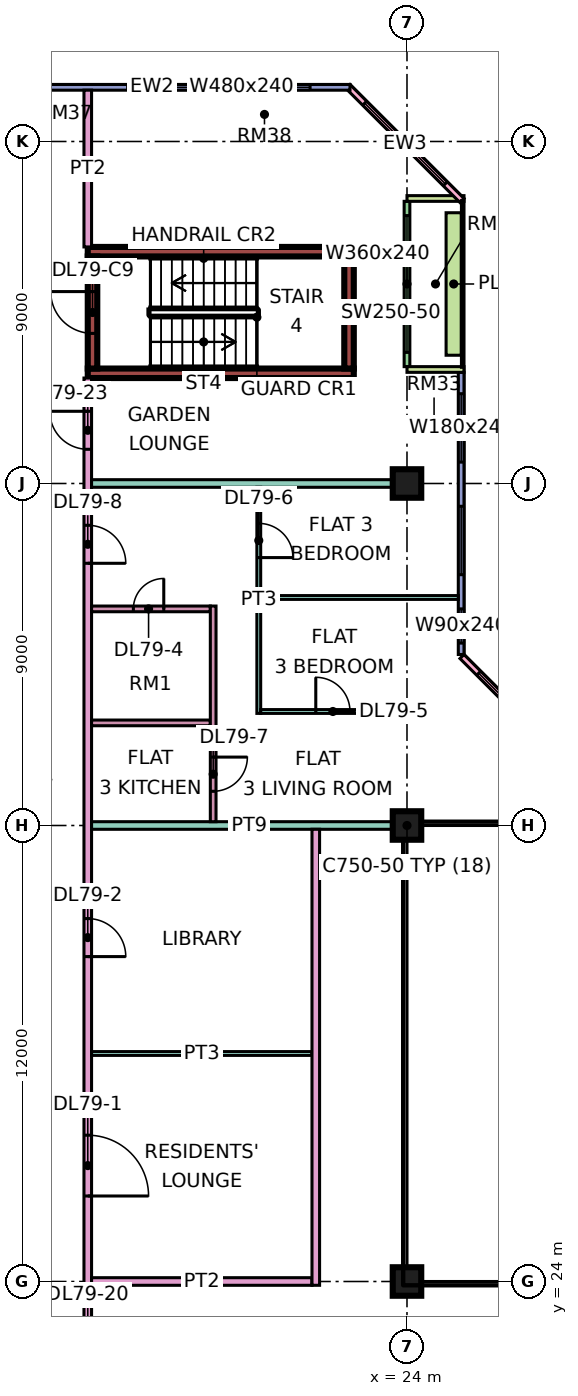
"""IFC4 building model, lengths in metres.
Left out: names, types, materials, properties, quantities, classifications, styles, units other than length and angle.
Written with IfcOpenShell. Run it as: python <this file> out.ifc"""

import sys

from ifc_helpers import new_model, si_unit, direction, frame, frame_2d, origin, origin_2d, place, context, subcontext, project, spatial, rectangle, extrude, element, fill, save


model = new_model("IFC4")
c1 = context("Model", 3, precision=1e-05, world=origin(), true_north=direction((0.0, 1.0)))
c2 = subcontext(c1, "Body", "Model", "MODEL_VIEW")
j1 = project(units=[si_unit("LENGTHUNIT", "METRE"), si_unit("PLANEANGLEUNIT", "RADIAN")], contexts=[c1])
p1 = place(None, origin())
s1 = spatial("IfcSite", under=j1, at=p1, CompositionType="ELEMENT")
p2 = place(p1, origin())
s2 = spatial("IfcBuilding", under=s1, at=p2, CompositionType="ELEMENT")
p3 = place(p2, frame((0.0, 0.0, 342.65)))
s3 = spatial("IfcBuildingStorey", under=s2, at=p3, CompositionType="ELEMENT", Elevation=342.65)
for number, where, z_axis, x_axis in (
    (1, (24.0, 24.0, 0.0), (0.0, 0.0, 1.0), (1.0, 0.0, 0.0)),
    (2, (24.0, 36.0, 0.0), (0.0, 0.0, 1.0), (1.0, 0.0, 0.0)),
    (3, (24.0, 45.0, 0.0), (0.0, 0.0, 1.0), (1.0, 0.0, 0.0)),
):
    element("IfcColumn", number, at=place(p3, frame(where, z_axis=z_axis, x_axis=x_axis)), inside=s3, PredefinedType="COLUMN", context=c2, shape_type="SweptSolid", body=[
        extrude(rectangle(XDim=0.75, YDim=0.75, at=origin_2d()), origin(), (0.0, 0.0, 1.0), 3.75),
    ])
for number, where, z_axis, x_axis in (
    (4, (15.6, 47.9, 0.0), (0.0, 0.0, 1.0), (1.0, 0.0, 0.0)),
    (5, (15.6, 51.1, 0.0), (0.0, 0.0, 1.0), (1.0, 0.0, 0.0)),
):
    element("IfcWall", number, at=place(p3, frame(where, z_axis=z_axis, x_axis=x_axis)), inside=s3, PredefinedType="SHEAR", context=c2, shape_type="SweptSolid", body=[
        extrude(rectangle(XDim=7.0, YDim=0.25, at=frame_2d((3.5, 0.0))), origin(), (0.0, 0.0, 1.0), 3.75),
    ])
p4 = place(p3, frame((15.725, 48.025, 0.0), z_axis=(0.0, 0.0, 1.0), x_axis=(0.0, 1.0, 0.0)))
e6 = element("IfcWall", 6, at=p4, inside=s3, PredefinedType="SHEAR", context=c2, shape_type="SweptSolid", body=[
    extrude(rectangle(XDim=2.95, YDim=0.25, at=frame_2d((1.475, 0.0))), origin(), (0.0, 0.0, 1.0), 3.75),
])
p5 = place(p4, frame((0.925, 0.0, 0.0)))
e7 = element("IfcOpeningElement", 7, at=p5, cuts=e6, PredefinedType="OPENING", context=c2, shape_type="SweptSolid", body=[
    extrude(rectangle(XDim=1.1, YDim=2.2, at=frame_2d((0.55, 1.1))), frame((0.0, 0.135, 0.0), z_axis=(0.0, -1.0, 0.0), x_axis=(1.0, 0.0, 0.0)), (0.0, 0.0, 1.0), 0.27),
])
p6 = place(p3, frame((22.475, 48.025, 0.0), z_axis=(0.0, 0.0, 1.0), x_axis=(0.0, 1.0, 0.0)))
e8 = element("IfcWall", 8, at=p6, inside=s3, PredefinedType="SHEAR", context=c2, shape_type="SweptSolid", body=[
    extrude(rectangle(XDim=2.95, YDim=0.25, at=frame_2d((1.475, 0.0))), origin(), (0.0, 0.0, 1.0), 3.75),
])
p7 = place(p3, frame((28.447, 37.447, 0.0), z_axis=(0.0, 0.0, 1.0), x_axis=(-0.707106781187, 0.707106781187, 0.0)))
e9 = element("IfcWall", 9, at=p7, inside=s3, PredefinedType="SOLIDWALL", context=c2, shape_type="SweptSolid", body=[
    extrude(rectangle(XDim=4.243, YDim=0.15, at=frame_2d((2.121, 0.0))), origin(), (0.0, 0.0, 1.0), 3.35),
])
p8 = place(p7, frame((0.621, 0.0, 0.45)))
e10 = element("IfcOpeningElement", 10, at=p8, cuts=e9, PredefinedType="OPENING", context=c2, shape_type="SweptSolid", body=[
    extrude(rectangle(XDim=3.0, YDim=2.4, at=frame_2d((1.5, 1.2))), frame((0.0, 0.085, 0.0), z_axis=(0.0, -1.0, 0.0), x_axis=(1.0, 0.0, 0.0)), (0.0, 0.0, 1.0), 0.17),
])
p9 = place(p3, frame((25.425, 40.5, 0.0), z_axis=(0.0, 0.0, 1.0), x_axis=(0.0, 1.0, 0.0)))
e11 = element("IfcWall", 11, at=p9, inside=s3, PredefinedType="SOLIDWALL", context=c2, shape_type="SweptSolid", body=[
    extrude(rectangle(XDim=7.425, YDim=0.15, at=frame_2d((3.712, 0.0))), origin(), (0.0, 0.0, 1.0), 3.35),
])
p10 = place(p9, frame((0.3, 0.0, 0.45)))
e12 = element("IfcOpeningElement", 12, at=p10, cuts=e11, PredefinedType="OPENING", context=c2, shape_type="SweptSolid", body=[
    extrude(rectangle(XDim=0.9, YDim=2.4, at=frame_2d((0.45, 1.2))), frame((0.0, 0.085, 0.0), z_axis=(0.0, -1.0, 0.0), x_axis=(1.0, 0.0, 0.0)), (0.0, 0.0, 1.0), 0.17),
])
p11 = place(p9, frame((2.1, 0.0, 0.45)))
e13 = element("IfcOpeningElement", 13, at=p11, cuts=e11, PredefinedType="OPENING", context=c2, shape_type="SweptSolid", body=[
    extrude(rectangle(XDim=1.8, YDim=2.4, at=frame_2d((0.9, 1.2))), frame((0.0, 0.085, 0.0), z_axis=(0.0, -1.0, 0.0), x_axis=(1.0, 0.0, 0.0)), (0.0, 0.0, 1.0), 0.17),
])
p12 = place(p9, frame((5.062, 0.0, 0.45)))
e14 = element("IfcOpeningElement", 14, at=p12, cuts=e11, PredefinedType="OPENING", context=c2, shape_type="SweptSolid", body=[
    extrude(rectangle(XDim=1.8, YDim=2.4, at=frame_2d((0.9, 1.2))), frame((0.0, 0.085, 0.0), z_axis=(0.0, -1.0, 0.0), x_axis=(1.0, 0.0, 0.0)), (0.0, 0.0, 1.0), 0.17),
])
p13 = place(p3, frame((24.0, 48.075, 0.0), z_axis=(0.0, 0.0, 1.0), x_axis=(0.0, 1.0, 0.0)))
e15 = element("IfcWall", 15, at=p13, inside=s3, PredefinedType="SOLIDWALL", context=c2, shape_type="SweptSolid", body=[
    extrude(rectangle(XDim=4.35, YDim=0.15, at=frame_2d((2.175, 0.0))), origin(), (0.0, 0.0, 1.0), 3.35),
])
p14 = place(p13, frame((0.375, 0.0, 0.45)))
e16 = element("IfcOpeningElement", 16, at=p14, cuts=e15, PredefinedType="OPENING", context=c2, shape_type="SweptSolid", body=[
    extrude(rectangle(XDim=3.6, YDim=2.4, at=frame_2d((1.8, 1.2))), frame((0.0, 0.085, 0.0), z_axis=(0.0, -1.0, 0.0), x_axis=(1.0, 0.0, 0.0)), (0.0, 0.0, 1.0), 0.17),
])
for number, where, z_axis, x_axis in (
    (17, (25.5, 48.0, 0.0), (0.0, 0.0, 1.0), (-1.0, 0.0, 0.0)),
    (18, (25.5, 52.5, 0.0), (0.0, 0.0, 1.0), (-1.0, 0.0, 0.0)),
):
    element("IfcWall", number, at=place(p3, frame(where, z_axis=z_axis, x_axis=x_axis)), inside=s3, PredefinedType="SOLIDWALL", context=c2, shape_type="SweptSolid", body=[
        extrude(rectangle(XDim=1.5, YDim=0.15, at=frame_2d((0.75, 0.0))), origin(), (0.0, 0.0, 1.0), 3.35),
    ])
p15 = place(p3, frame((25.447, 52.447, 0.0), z_axis=(0.0, 0.0, 1.0), x_axis=(-0.707106781187, 0.707106781187, 0.0)))
e19 = element("IfcWall", 19, at=p15, inside=s3, PredefinedType="SOLIDWALL", context=c2, shape_type="SweptSolid", body=[
    extrude(rectangle(XDim=4.243, YDim=0.15, at=frame_2d((2.121, 0.0))), origin(), (0.0, 0.0, 1.0), 3.35),
])
p16 = place(p15, frame((0.621, 0.0, 0.45)))
e20 = element("IfcOpeningElement", 20, at=p16, cuts=e19, PredefinedType="OPENING", context=c2, shape_type="SweptSolid", body=[
    extrude(rectangle(XDim=3.0, YDim=2.4, at=frame_2d((1.5, 1.2))), frame((0.0, 0.085, 0.0), z_axis=(0.0, -1.0, 0.0), x_axis=(1.0, 0.0, 0.0)), (0.0, 0.0, 1.0), 0.17),
])
p17 = place(p3, frame((22.5, 55.425, 0.0), z_axis=(0.0, 0.0, 1.0), x_axis=(-1.0, 0.0, 0.0)))
e21 = element("IfcWall", 21, at=p17, inside=s3, PredefinedType="SOLIDWALL", context=c2, shape_type="SweptSolid", body=[
    extrude(rectangle(XDim=10.425, YDim=0.15, at=frame_2d((5.212, 0.0))), origin(), (0.0, 0.0, 1.0), 3.35),
])
p18 = place(p17, frame((1.05, 0.0, 0.45)))
e22 = element("IfcOpeningElement", 22, at=p18, cuts=e21, PredefinedType="OPENING", context=c2, shape_type="SweptSolid", body=[
    extrude(rectangle(XDim=4.8, YDim=2.4, at=frame_2d((2.4, 1.2))), frame((0.0, 0.085, 0.0), z_axis=(0.0, -1.0, 0.0), x_axis=(1.0, 0.0, 0.0)), (0.0, 0.0, 1.0), 0.17),
])
p19 = place(p3, frame((25.229, 48.375, 0.0), z_axis=(0.0, 0.0, 1.0), x_axis=(0.0, 1.0, 0.0)))
e23 = element("IfcWall", 23, at=p19, inside=s3, PredefinedType="SOLIDWALL", context=c2, shape_type="SweptSolid", body=[
    extrude(rectangle(XDim=3.75, YDim=0.4, at=frame_2d((1.875, 0.0))), origin(), (0.0, 0.0, 1.0), 0.7),
])
p20 = place(p3, frame((15.6, 20.0, 0.0), z_axis=(0.0, 0.0, 1.0), x_axis=(0.0, 1.0, 0.0)))
e24 = element("IfcWall", 24, at=p20, inside=s3, PredefinedType="PARTITIONING", context=c2, shape_type="SweptSolid", body=[
    extrude(rectangle(XDim=27.775, YDim=0.2, at=frame_2d((13.887, 0.0))), origin(), (0.0, 0.0, 1.0), 3.35),
])
p21 = place(p20, frame((6.25, 0.0, 0.0)))
e25 = element("IfcOpeningElement", 25, at=p21, cuts=e24, PredefinedType="OPENING", context=c2, shape_type="SweptSolid", body=[
    extrude(rectangle(XDim=1.6, YDim=2.1, at=frame_2d((0.8, 1.05))), frame((0.0, 0.11, 0.0), z_axis=(0.0, -1.0, 0.0), x_axis=(1.0, 0.0, 0.0)), (0.0, 0.0, 1.0), 0.22),
])
p22 = place(p20, frame((12.55, 0.0, 0.0)))
e26 = element("IfcOpeningElement", 26, at=p22, cuts=e24, PredefinedType="OPENING", context=c2, shape_type="SweptSolid", body=[
    extrude(rectangle(XDim=1.0, YDim=2.1, at=frame_2d((0.5, 1.05))), frame((0.0, 0.11, 0.0), z_axis=(0.0, -1.0, 0.0), x_axis=(1.0, 0.0, 0.0)), (0.0, 0.0, 1.0), 0.22),
])
p23 = place(p20, frame((22.9, 0.0, 0.0)))
e27 = element("IfcOpeningElement", 27, at=p23, cuts=e24, PredefinedType="OPENING", context=c2, shape_type="SweptSolid", body=[
    extrude(rectangle(XDim=1.0, YDim=2.1, at=frame_2d((0.5, 1.05))), frame((0.0, 0.11, 0.0), z_axis=(0.0, -1.0, 0.0), x_axis=(1.0, 0.0, 0.0)), (0.0, 0.0, 1.0), 0.22),
])
p24 = place(p20, frame((1.15, 0.0, 0.0)))
e28 = element("IfcOpeningElement", 28, at=p24, cuts=e24, PredefinedType="OPENING", context=c2, shape_type="SweptSolid", body=[
    extrude(rectangle(XDim=1.8, YDim=2.1, at=frame_2d((0.9, 1.05))), frame((0.0, 0.11, 0.0), z_axis=(0.0, -1.0, 0.0), x_axis=(1.0, 0.0, 0.0)), (0.0, 0.0, 1.0), 0.22),
])
p25 = place(p20, frame((25.9, 0.0, 0.0)))
e29 = element("IfcOpeningElement", 29, at=p25, cuts=e24, PredefinedType="OPENING", context=c2, shape_type="SweptSolid", body=[
    extrude(rectangle(XDim=1.0, YDim=2.1, at=frame_2d((0.5, 1.05))), frame((0.0, 0.11, 0.0), z_axis=(0.0, -1.0, 0.0), x_axis=(1.0, 0.0, 0.0)), (0.0, 0.0, 1.0), 0.22),
])
p26 = place(p3, frame((15.6, 51.225, 0.0), z_axis=(0.0, 0.0, 1.0), x_axis=(0.0, 1.0, 0.0)))
e30 = element("IfcWall", 30, at=p26, inside=s3, PredefinedType="PARTITIONING", context=c2, shape_type="SweptSolid", body=[
    extrude(rectangle(XDim=4.125, YDim=0.2, at=frame_2d((2.062, 0.0))), origin(), (0.0, 0.0, 1.0), 3.35),
])
p27 = place(p3, frame((15.7, 24.0, 0.0), z_axis=(0.0, 0.0, 1.0), x_axis=(1.0, 0.0, 0.0)))
e31 = element("IfcWall", 31, at=p27, inside=s3, PredefinedType="PARTITIONING", context=c2, shape_type="SweptSolid", body=[
    extrude(rectangle(XDim=5.8, YDim=0.2, at=frame_2d((2.9, 0.0))), origin(), (0.0, 0.0, 1.0), 3.35),
])
p28 = place(p3, frame((15.7, 30.0, 0.0), z_axis=(0.0, 0.0, 1.0), x_axis=(1.0, 0.0, 0.0)))
e32 = element("IfcWall", 32, at=p28, inside=s3, PredefinedType="PARTITIONING", context=c2, shape_type="SweptSolid", body=[
    extrude(rectangle(XDim=5.8, YDim=0.1, at=frame_2d((2.9, 0.0))), origin(), (0.0, 0.0, 1.0), 3.35),
])
p29 = place(p3, frame((15.7, 36.0, 0.0), z_axis=(0.0, 0.0, 1.0), x_axis=(1.0, 0.0, 0.0)))
e33 = element("IfcWall", 33, at=p29, inside=s3, PredefinedType="PARTITIONING", context=c2, shape_type="SweptSolid", body=[
    extrude(rectangle(XDim=8.3, YDim=0.2, at=frame_2d((4.15, 0.0))), origin(), (0.0, 0.0, 1.0), 3.35),
])
p30 = place(p3, frame((15.7, 38.7, 0.0), z_axis=(0.0, 0.0, 1.0), x_axis=(1.0, 0.0, 0.0)))
e34 = element("IfcWall", 34, at=p30, inside=s3, PredefinedType="PARTITIONING", context=c2, shape_type="SweptSolid", body=[
    extrude(rectangle(XDim=3.125, YDim=0.15, at=frame_2d((1.562, 0.0))), origin(), (0.0, 0.0, 1.0), 3.35),
])
p31 = place(p3, frame((15.7, 41.7, 0.0), z_axis=(0.0, 0.0, 1.0), x_axis=(1.0, 0.0, 0.0)))
e35 = element("IfcWall", 35, at=p31, inside=s3, PredefinedType="PARTITIONING", context=c2, shape_type="SweptSolid", body=[
    extrude(rectangle(XDim=3.125, YDim=0.15, at=frame_2d((1.562, 0.0))), origin(), (0.0, 0.0, 1.0), 3.35),
])
p32 = place(p31, frame((1.1, 0.0, 0.0)))
e36 = element("IfcOpeningElement", 36, at=p32, cuts=e35, PredefinedType="OPENING", context=c2, shape_type="SweptSolid", body=[
    extrude(rectangle(XDim=0.8, YDim=2.1, at=frame_2d((0.4, 1.05))), frame((0.0, 0.085, 0.0), z_axis=(0.0, -1.0, 0.0), x_axis=(1.0, 0.0, 0.0)), (0.0, 0.0, 1.0), 0.17),
])
p33 = place(p3, frame((15.7, 45.0, 0.0), z_axis=(0.0, 0.0, 1.0), x_axis=(1.0, 0.0, 0.0)))
e37 = element("IfcWall", 37, at=p33, inside=s3, PredefinedType="PARTITIONING", context=c2, shape_type="SweptSolid", body=[
    extrude(rectangle(XDim=8.3, YDim=0.2, at=frame_2d((4.15, 0.0))), origin(), (0.0, 0.0, 1.0), 3.35),
])
p34 = place(p3, frame((18.9, 36.1, 0.0), z_axis=(0.0, 0.0, 1.0), x_axis=(0.0, 1.0, 0.0)))
e38 = element("IfcWall", 38, at=p34, inside=s3, PredefinedType="PARTITIONING", context=c2, shape_type="SweptSolid", body=[
    extrude(rectangle(XDim=5.675, YDim=0.15, at=frame_2d((2.837, 0.0))), origin(), (0.0, 0.0, 1.0), 3.35),
])
p35 = place(p34, frame((0.8, 0.0, 0.0)))
e39 = element("IfcOpeningElement", 39, at=p35, cuts=e38, PredefinedType="OPENING", context=c2, shape_type="SweptSolid", body=[
    extrude(rectangle(XDim=0.9, YDim=2.1, at=frame_2d((0.45, 1.05))), frame((0.0, 0.085, 0.0), z_axis=(0.0, -1.0, 0.0), x_axis=(1.0, 0.0, 0.0)), (0.0, 0.0, 1.0), 0.17),
])
p36 = place(p3, frame((20.1, 38.95, 0.0), z_axis=(0.0, 0.0, 1.0), x_axis=(0.0, 1.0, 0.0)))
e40 = element("IfcWall", 40, at=p36, inside=s3, PredefinedType="PARTITIONING", context=c2, shape_type="SweptSolid", body=[
    extrude(rectangle(XDim=5.95, YDim=0.1, at=frame_2d((2.975, 0.0))), origin(), (0.0, 0.0, 1.0), 3.35),
])
p37 = place(p36, frame((4.1, 0.0, 0.0)))
e41 = element("IfcOpeningElement", 41, at=p37, cuts=e40, PredefinedType="OPENING", context=c2, shape_type="SweptSolid", body=[
    extrude(rectangle(XDim=0.9, YDim=2.1, at=frame_2d((0.45, 1.05))), frame((0.0, 0.06, 0.0), z_axis=(0.0, -1.0, 0.0), x_axis=(1.0, 0.0, 0.0)), (0.0, 0.0, 1.0), 0.12),
])
p38 = place(p3, frame((20.15, 39.0, 0.0), z_axis=(0.0, 0.0, 1.0), x_axis=(1.0, 0.0, 0.0)))
e42 = element("IfcWall", 42, at=p38, inside=s3, PredefinedType="PARTITIONING", context=c2, shape_type="SweptSolid", body=[
    extrude(rectangle(XDim=3.85, YDim=0.1, at=frame_2d((1.925, 0.0))), origin(), (0.0, 0.0, 1.0), 3.35),
])
p39 = place(p38, frame((1.45, 0.0, 0.0)))
e43 = element("IfcOpeningElement", 43, at=p39, cuts=e42, PredefinedType="OPENING", context=c2, shape_type="SweptSolid", body=[
    extrude(rectangle(XDim=0.9, YDim=2.1, at=frame_2d((0.45, 1.05))), frame((0.0, 0.06, 0.0), z_axis=(0.0, -1.0, 0.0), x_axis=(1.0, 0.0, 0.0)), (0.0, 0.0, 1.0), 0.12),
])
p40 = place(p3, frame((20.15, 42.0, 0.0), z_axis=(0.0, 0.0, 1.0), x_axis=(1.0, 0.0, 0.0)))
e44 = element("IfcWall", 44, at=p40, inside=s3, PredefinedType="PARTITIONING", context=c2, shape_type="SweptSolid", body=[
    extrude(rectangle(XDim=5.201, YDim=0.1, at=frame_2d((2.601, 0.0))), origin(), (0.0, 0.0, 1.0), 3.35),
])
p41 = place(p3, frame((21.6, 23.9, 0.0), z_axis=(0.0, 0.0, 1.0), x_axis=(0.0, 1.0, 0.0)))
e45 = element("IfcWall", 45, at=p41, inside=s3, PredefinedType="PARTITIONING", context=c2, shape_type="SweptSolid", body=[
    extrude(rectangle(XDim=12.0, YDim=0.2, at=frame_2d((6.0, 0.0))), origin(), (0.0, 0.0, 1.0), 3.35),
])
p42 = place(p8, origin())
e46 = element("IfcWindow", 46, at=p42, inside=s3, PartitioningType="SINGLE_PANEL", PredefinedType="WINDOW", context=c2, shape_type="SweptSolid", body=[
    extrude(rectangle(XDim=3.0, YDim=2.4, at=frame_2d((1.5, 1.2))), frame((0.0, 0.03, 0.0), z_axis=(0.0, -1.0, 0.0), x_axis=(1.0, 0.0, 0.0)), (0.0, 0.0, 1.0), 0.06),
])
fill(e10, e46)
p43 = place(p10, origin())
e47 = element("IfcWindow", 47, at=p43, inside=s3, PartitioningType="SINGLE_PANEL", PredefinedType="WINDOW", context=c2, shape_type="SweptSolid", body=[
    extrude(rectangle(XDim=0.9, YDim=2.4, at=frame_2d((0.45, 1.2))), frame((0.0, 0.03, 0.0), z_axis=(0.0, -1.0, 0.0), x_axis=(1.0, 0.0, 0.0)), (0.0, 0.0, 1.0), 0.06),
])
fill(e12, e47)
p44 = place(p11, origin())
e48 = element("IfcWindow", 48, at=p44, inside=s3, PartitioningType="SINGLE_PANEL", PredefinedType="WINDOW", context=c2, shape_type="SweptSolid", body=[
    extrude(rectangle(XDim=1.8, YDim=2.4, at=frame_2d((0.9, 1.2))), frame((0.0, 0.03, 0.0), z_axis=(0.0, -1.0, 0.0), x_axis=(1.0, 0.0, 0.0)), (0.0, 0.0, 1.0), 0.06),
])
fill(e13, e48)
p45 = place(p12, origin())
e49 = element("IfcWindow", 49, at=p45, inside=s3, PartitioningType="SINGLE_PANEL", PredefinedType="WINDOW", context=c2, shape_type="SweptSolid", body=[
    extrude(rectangle(XDim=1.8, YDim=2.4, at=frame_2d((0.9, 1.2))), frame((0.0, 0.03, 0.0), z_axis=(0.0, -1.0, 0.0), x_axis=(1.0, 0.0, 0.0)), (0.0, 0.0, 1.0), 0.06),
])
fill(e14, e49)
p46 = place(p14, origin())
e50 = element("IfcWindow", 50, at=p46, inside=s3, PartitioningType="SINGLE_PANEL", PredefinedType="WINDOW", context=c2, shape_type="SweptSolid", body=[
    extrude(rectangle(XDim=3.6, YDim=2.4, at=frame_2d((1.8, 1.2))), frame((0.0, 0.03, 0.0), z_axis=(0.0, -1.0, 0.0), x_axis=(1.0, 0.0, 0.0)), (0.0, 0.0, 1.0), 0.06),
])
fill(e16, e50)
p47 = place(p16, origin())
e51 = element("IfcWindow", 51, at=p47, inside=s3, PartitioningType="SINGLE_PANEL", PredefinedType="WINDOW", context=c2, shape_type="SweptSolid", body=[
    extrude(rectangle(XDim=3.0, YDim=2.4, at=frame_2d((1.5, 1.2))), frame((0.0, 0.03, 0.0), z_axis=(0.0, -1.0, 0.0), x_axis=(1.0, 0.0, 0.0)), (0.0, 0.0, 1.0), 0.06),
])
fill(e20, e51)
p48 = place(p18, origin())
e52 = element("IfcWindow", 52, at=p48, inside=s3, PartitioningType="SINGLE_PANEL", PredefinedType="WINDOW", context=c2, shape_type="SweptSolid", body=[
    extrude(rectangle(XDim=4.8, YDim=2.4, at=frame_2d((2.4, 1.2))), frame((0.0, 0.03, 0.0), z_axis=(0.0, -1.0, 0.0), x_axis=(1.0, 0.0, 0.0)), (0.0, 0.0, 1.0), 0.06),
])
fill(e22, e52)
p49 = place(p5, frame((1.1, 0.0, 0.0), z_axis=(0.0, 0.0, 1.0), x_axis=(-1.0, 0.0, 0.0)))
e53 = element("IfcDoor", 53, at=p49, inside=s3, OperationType="SINGLE_SWING_RIGHT", PredefinedType="DOOR", context=c2, shape_type="SweptSolid", body=[
    extrude(rectangle(XDim=1.1, YDim=2.2, at=frame_2d((0.55, 1.1))), frame((0.0, 0.025, 0.0), z_axis=(0.0, -1.0, 0.0), x_axis=(1.0, 0.0, 0.0)), (0.0, 0.0, 1.0), 0.05),
])
fill(e7, e53)
p50 = place(p21, frame((1.6, 0.0, 0.0), z_axis=(0.0, 0.0, 1.0), x_axis=(-1.0, 0.0, 0.0)))
e54 = element("IfcDoor", 54, at=p50, inside=s3, OperationType="DOUBLE_DOOR_SINGLE_SWING", PredefinedType="DOOR", context=c2, shape_type="SweptSolid", body=[
    extrude(rectangle(XDim=1.6, YDim=2.1, at=frame_2d((0.8, 1.05))), frame((0.0, 0.025, 0.0), z_axis=(0.0, -1.0, 0.0), x_axis=(1.0, 0.0, 0.0)), (0.0, 0.0, 1.0), 0.05),
])
fill(e25, e54)
p51 = place(p22, frame((1.0, 0.0, 0.0), z_axis=(0.0, 0.0, 1.0), x_axis=(-1.0, 0.0, 0.0)))
e55 = element("IfcDoor", 55, at=p51, inside=s3, OperationType="SINGLE_SWING_LEFT", PredefinedType="DOOR", context=c2, shape_type="SweptSolid", body=[
    extrude(rectangle(XDim=1.0, YDim=2.1, at=frame_2d((0.5, 1.05))), frame((0.0, 0.025, 0.0), z_axis=(0.0, -1.0, 0.0), x_axis=(1.0, 0.0, 0.0)), (0.0, 0.0, 1.0), 0.05),
])
fill(e26, e55)
p52 = place(p32, frame((0.8, 0.0, 0.0), z_axis=(0.0, 0.0, 1.0), x_axis=(-1.0, 0.0, 0.0)))
e56 = element("IfcDoor", 56, at=p52, inside=s3, OperationType="SINGLE_SWING_RIGHT", PredefinedType="DOOR", context=c2, shape_type="SweptSolid", body=[
    extrude(rectangle(XDim=0.8, YDim=2.1, at=frame_2d((0.4, 1.05))), frame((0.0, 0.025, 0.0), z_axis=(0.0, -1.0, 0.0), x_axis=(1.0, 0.0, 0.0)), (0.0, 0.0, 1.0), 0.05),
])
fill(e36, e56)
p53 = place(p39, origin())
e57 = element("IfcDoor", 57, at=p53, inside=s3, OperationType="SINGLE_SWING_LEFT", PredefinedType="DOOR", context=c2, shape_type="SweptSolid", body=[
    extrude(rectangle(XDim=0.9, YDim=2.1, at=frame_2d((0.45, 1.05))), frame((0.0, 0.025, 0.0), z_axis=(0.0, -1.0, 0.0), x_axis=(1.0, 0.0, 0.0)), (0.0, 0.0, 1.0), 0.05),
])
fill(e43, e57)
p54 = place(p37, frame((0.9, 0.0, 0.0), z_axis=(0.0, 0.0, 1.0), x_axis=(-1.0, 0.0, 0.0)))
e58 = element("IfcDoor", 58, at=p54, inside=s3, OperationType="SINGLE_SWING_LEFT", PredefinedType="DOOR", context=c2, shape_type="SweptSolid", body=[
    extrude(rectangle(XDim=0.9, YDim=2.1, at=frame_2d((0.45, 1.05))), frame((0.0, 0.025, 0.0), z_axis=(0.0, -1.0, 0.0), x_axis=(1.0, 0.0, 0.0)), (0.0, 0.0, 1.0), 0.05),
])
fill(e41, e58)
p55 = place(p35, origin())
e59 = element("IfcDoor", 59, at=p55, inside=s3, OperationType="SINGLE_SWING_RIGHT", PredefinedType="DOOR", context=c2, shape_type="SweptSolid", body=[
    extrude(rectangle(XDim=0.9, YDim=2.1, at=frame_2d((0.45, 1.05))), frame((0.0, 0.025, 0.0), z_axis=(0.0, -1.0, 0.0), x_axis=(1.0, 0.0, 0.0)), (0.0, 0.0, 1.0), 0.05),
])
fill(e39, e59)
p56 = place(p23, frame((1.0, 0.0, 0.0), z_axis=(0.0, 0.0, 1.0), x_axis=(-1.0, 0.0, 0.0)))
e60 = element("IfcDoor", 60, at=p56, inside=s3, OperationType="SINGLE_SWING_LEFT", PredefinedType="DOOR", context=c2, shape_type="SweptSolid", body=[
    extrude(rectangle(XDim=1.0, YDim=2.1, at=frame_2d((0.5, 1.05))), frame((0.0, 0.025, 0.0), z_axis=(0.0, -1.0, 0.0), x_axis=(1.0, 0.0, 0.0)), (0.0, 0.0, 1.0), 0.05),
])
fill(e27, e60)
p57 = place(p25, frame((1.0, 0.0, 0.0), z_axis=(0.0, 0.0, 1.0), x_axis=(-1.0, 0.0, 0.0)))
e61 = element("IfcDoor", 61, at=p57, inside=s3, OperationType="SINGLE_SWING_RIGHT", PredefinedType="DOOR", context=c2, shape_type="SweptSolid", body=[
    extrude(rectangle(XDim=1.0, YDim=2.1, at=frame_2d((0.5, 1.05))), frame((0.0, 0.025, 0.0), z_axis=(0.0, -1.0, 0.0), x_axis=(1.0, 0.0, 0.0)), (0.0, 0.0, 1.0), 0.05),
])
fill(e29, e61)
save(model, sys.argv[1])
